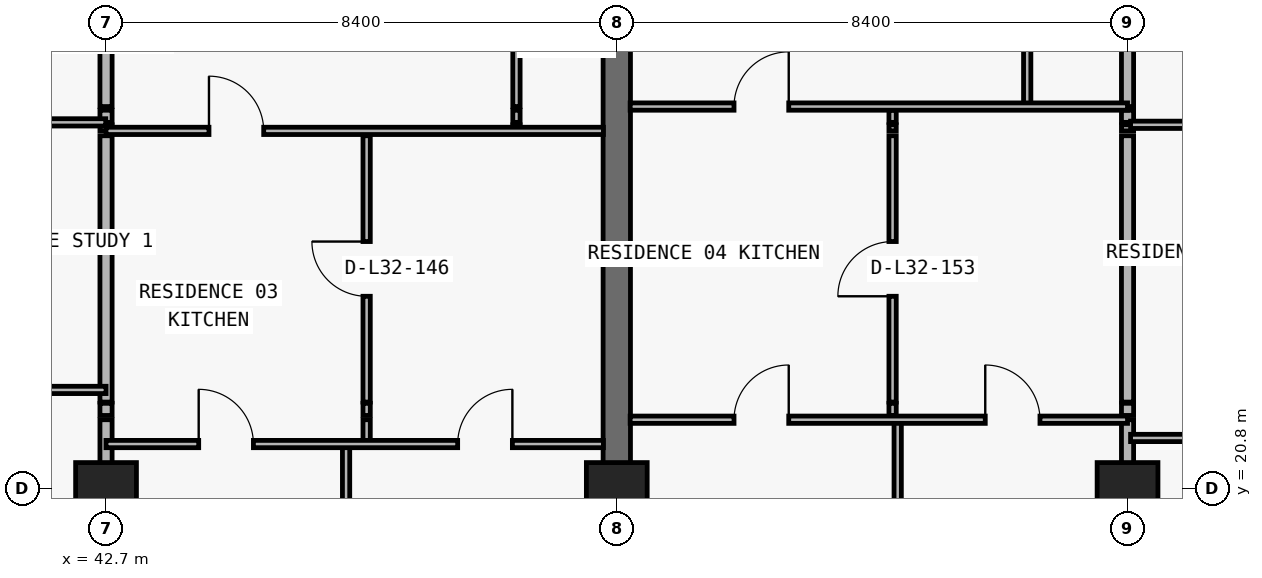
"""IFC4 building model, lengths in metres.
Left out: names, types, materials, properties, quantities, classifications, styles, units other than length and angle.
Written with IfcOpenShell. Run it as: python <this file> out.ifc"""

import sys

from ifc_helpers import new_model, si_unit, direction, frame, frame_2d, origin, origin_2d, place, context, subcontext, project, spatial, rectangle, extrude, element, fill, save


model = new_model("IFC4")
c1 = context("Model", 3, precision=1e-05, world=origin(), true_north=direction((0.0, 1.0)))
c2 = subcontext(c1, "Body", "Model", "MODEL_VIEW")
j1 = project(units=[si_unit("LENGTHUNIT", "METRE"), si_unit("PLANEANGLEUNIT", "RADIAN")], contexts=[c1])
p1 = place(None, origin())
s1 = spatial("IfcSite", under=j1, at=p1, CompositionType="ELEMENT")
p2 = place(p1, origin())
s2 = spatial("IfcBuilding", under=s1, at=p2, CompositionType="ELEMENT")
p3 = place(p2, frame((0.0, 0.0, 119.1)))
s3 = spatial("IfcBuildingStorey", under=s2, at=p3, CompositionType="ELEMENT", Elevation=119.1)
for number, where, z_axis, x_axis in (
    (1, (42.7, 20.8, 0.0), (0.0, 0.0, 1.0), (1.0, 0.0, 0.0)),
    (2, (51.1, 20.8, 0.0), (0.0, 0.0, 1.0), (1.0, 0.0, 0.0)),
    (3, (59.5, 20.8, 0.0), (0.0, 0.0, 1.0), (1.0, 0.0, 0.0)),
):
    element("IfcColumn", number, at=place(p3, frame(where, z_axis=z_axis, x_axis=x_axis)), inside=s3, PredefinedType="COLUMN", context=c2, shape_type="SweptSolid", body=[
        extrude(rectangle(XDim=1.0, YDim=0.85, at=origin_2d()), origin(), (0.0, 0.0, 1.0), 3.05),
    ])
p4 = place(p3, frame((51.1, 20.8, 0.0), z_axis=(0.0, 0.0, 1.0), x_axis=(0.0, 1.0, 0.0)))
e4 = element("IfcWall", 4, at=p4, inside=s3, PredefinedType="SHEAR", context=c2, shape_type="SweptSolid", body=[
    extrude(rectangle(XDim=8.6, YDim=0.45, at=frame_2d((4.3, 0.0))), origin(), (0.0, 0.0, 1.0), 3.05),
])
p5 = place(p3, frame((42.7, 8.84, 0.0), z_axis=(0.0, 0.0, 1.0), x_axis=(0.0, 1.0, 0.0)))
e5 = element("IfcWall", 5, at=p5, inside=s3, PredefinedType="PARTITIONING", context=c2, shape_type="SweptSolid", body=[
    extrude(rectangle(XDim=13.09, YDim=0.2, at=frame_2d((6.545, 0.0))), origin(), (0.0, 0.0, 1.0), 2.174),
])
p6 = place(p3, frame((42.7, 22.0, 0.0), z_axis=(0.0, 0.0, 1.0), x_axis=(0.0, 1.0, 0.0)))
e6 = element("IfcWall", 6, at=p6, inside=s3, PredefinedType="PARTITIONING", context=c2, shape_type="SweptSolid", body=[
    extrude(rectangle(XDim=0.2, YDim=0.2, at=frame_2d((0.1, 0.0))), origin(), (0.0, 0.0, 1.0), 2.174),
])
p7 = place(p3, frame((42.7, 22.22, 0.0), z_axis=(0.0, 0.0, 1.0), x_axis=(0.0, 1.0, 0.0)))
e7 = element("IfcWall", 7, at=p7, inside=s3, PredefinedType="PARTITIONING", context=c2, shape_type="SweptSolid", body=[
    extrude(rectangle(XDim=4.38, YDim=0.2, at=frame_2d((2.19, 0.0))), origin(), (0.0, 0.0, 1.0), 2.174),
])
p8 = place(p3, frame((42.7, 26.68, 0.0), z_axis=(0.0, 0.0, 1.0), x_axis=(0.0, 1.0, 0.0)))
e8 = element("IfcWall", 8, at=p8, inside=s3, PredefinedType="PARTITIONING", context=c2, shape_type="SweptSolid", body=[
    extrude(rectangle(XDim=0.1, YDim=0.2, at=frame_2d((0.05, 0.0))), origin(), (0.0, 0.0, 1.0), 2.174),
])
p9 = place(p3, frame((42.7, 26.82, 0.0), z_axis=(0.0, 0.0, 1.0), x_axis=(0.0, 1.0, 0.0)))
e9 = element("IfcWall", 9, at=p9, inside=s3, PredefinedType="PARTITIONING", context=c2, shape_type="SweptSolid", body=[
    extrude(rectangle(XDim=0.2, YDim=0.2, at=frame_2d((0.1, 0.0))), origin(), (0.0, 0.0, 1.0), 2.174),
])
p10 = place(p3, frame((42.7, 27.08, 0.0), z_axis=(0.0, 0.0, 1.0), x_axis=(0.0, 1.0, 0.0)))
e10 = element("IfcWall", 10, at=p10, inside=s3, PredefinedType="PARTITIONING", context=c2, shape_type="SweptSolid", body=[
    extrude(rectangle(XDim=6.52, YDim=0.2, at=frame_2d((3.26, 0.0))), origin(), (0.0, 0.0, 1.0), 2.174),
])
p11 = place(p3, frame((46.648, 8.84, 0.0), z_axis=(0.0, 0.0, 1.0), x_axis=(0.0, 1.0, 0.0)))
e11 = element("IfcWall", 11, at=p11, inside=s3, PredefinedType="PARTITIONING", context=c2, shape_type="SweptSolid", body=[
    extrude(rectangle(XDim=12.69, YDim=0.12, at=frame_2d((6.345, 0.0))), origin(), (0.0, 0.0, 1.0), 3.05),
])
p12 = place(p3, frame((46.986, 21.53, 0.0), z_axis=(0.0, 0.0, 1.0), x_axis=(0.0, 1.0, 0.0)))
e12 = element("IfcWall", 12, at=p12, inside=s3, PredefinedType="PARTITIONING", context=c2, shape_type="SweptSolid", body=[
    extrude(rectangle(XDim=0.4, YDim=0.12, at=frame_2d((0.2, 0.0))), origin(), (0.0, 0.0, 1.0), 3.05),
])
p13 = place(p3, frame((46.986, 22.0, 0.0), z_axis=(0.0, 0.0, 1.0), x_axis=(0.0, 1.0, 0.0)))
e13 = element("IfcWall", 13, at=p13, inside=s3, PredefinedType="PARTITIONING", context=c2, shape_type="SweptSolid", body=[
    extrude(rectangle(XDim=0.2, YDim=0.12, at=frame_2d((0.1, 0.0))), origin(), (0.0, 0.0, 1.0), 3.05),
])
p14 = place(p3, frame((46.986, 22.22, 0.0), z_axis=(0.0, 0.0, 1.0), x_axis=(0.0, 1.0, 0.0)))
e14 = element("IfcWall", 14, at=p14, inside=s3, PredefinedType="PARTITIONING", context=c2, shape_type="SweptSolid", body=[
    extrude(rectangle(XDim=4.38, YDim=0.12, at=frame_2d((2.19, 0.0))), origin(), (0.0, 0.0, 1.0), 3.05),
])
p15 = place(p14, frame((1.74, 0.0, 0.0)))
e15 = element("IfcOpeningElement", 15, at=p15, cuts=e14, PredefinedType="OPENING", context=c2, shape_type="SweptSolid", body=[
    extrude(rectangle(XDim=0.9, YDim=2.15, at=frame_2d((0.45, 1.075))), frame((0.0, 0.07, 0.0), z_axis=(0.0, -1.0, 0.0), x_axis=(1.0, 0.0, 0.0)), (0.0, 0.0, 1.0), 0.14),
])
p16 = place(p3, frame((49.45, 26.68, 0.0), z_axis=(0.0, 0.0, 1.0), x_axis=(0.0, 1.0, 0.0)))
e16 = element("IfcWall", 16, at=p16, inside=s3, PredefinedType="PARTITIONING", context=c2, shape_type="SweptSolid", body=[
    extrude(rectangle(XDim=0.1, YDim=0.12, at=frame_2d((0.05, 0.0))), origin(), (0.0, 0.0, 1.0), 3.05),
])
p17 = place(p3, frame((49.45, 26.82, 0.0), z_axis=(0.0, 0.0, 1.0), x_axis=(0.0, 1.0, 0.0)))
e17 = element("IfcWall", 17, at=p17, inside=s3, PredefinedType="PARTITIONING", context=c2, shape_type="SweptSolid", body=[
    extrude(rectangle(XDim=0.2, YDim=0.12, at=frame_2d((0.1, 0.0))), origin(), (0.0, 0.0, 1.0), 3.05),
])
p18 = place(p3, frame((49.45, 27.08, 0.0), z_axis=(0.0, 0.0, 1.0), x_axis=(0.0, 1.0, 0.0)))
e18 = element("IfcWall", 18, at=p18, inside=s3, PredefinedType="PARTITIONING", context=c2, shape_type="SweptSolid", body=[
    extrude(rectangle(XDim=6.52, YDim=0.12, at=frame_2d((3.26, 0.0))), origin(), (0.0, 0.0, 1.0), 3.05),
])
p19 = place(p18, frame((3.285, 0.0, 0.0)))
e19 = element("IfcOpeningElement", 19, at=p19, cuts=e18, PredefinedType="OPENING", context=c2, shape_type="SweptSolid", body=[
    extrude(rectangle(XDim=0.85, YDim=2.1, at=frame_2d((0.425, 1.05))), frame((0.0, 0.07, 0.0), z_axis=(0.0, -1.0, 0.0), x_axis=(1.0, 0.0, 0.0)), (0.0, 0.0, 1.0), 0.14),
])
p20 = place(p3, frame((51.1, 8.84, 0.0), z_axis=(0.0, 0.0, 1.0), x_axis=(0.0, 1.0, 0.0)))
e20 = element("IfcWall", 20, at=p20, inside=s3, PredefinedType="PARTITIONING", context=c2, shape_type="SweptSolid", body=[
    extrude(rectangle(XDim=11.955, YDim=0.2, at=frame_2d((5.978, 0.0))), origin(), (0.0, 0.0, 1.0), 2.174),
])
p21 = place(p3, frame((55.636, 22.0, 0.0), z_axis=(0.0, 0.0, 1.0), x_axis=(0.0, 1.0, 0.0)))
e21 = element("IfcWall", 21, at=p21, inside=s3, PredefinedType="PARTITIONING", context=c2, shape_type="SweptSolid", body=[
    extrude(rectangle(XDim=0.2, YDim=0.12, at=frame_2d((0.1, 0.0))), origin(), (0.0, 0.0, 1.0), 3.05),
])
p22 = place(p3, frame((55.636, 22.22, 0.0), z_axis=(0.0, 0.0, 1.0), x_axis=(0.0, 1.0, 0.0)))
e22 = element("IfcWall", 22, at=p22, inside=s3, PredefinedType="PARTITIONING", context=c2, shape_type="SweptSolid", body=[
    extrude(rectangle(XDim=4.38, YDim=0.12, at=frame_2d((2.19, 0.0))), origin(), (0.0, 0.0, 1.0), 3.05),
])
p23 = place(p22, frame((1.74, 0.0, 0.0)))
e23 = element("IfcOpeningElement", 23, at=p23, cuts=e22, PredefinedType="OPENING", context=c2, shape_type="SweptSolid", body=[
    extrude(rectangle(XDim=0.9, YDim=2.15, at=frame_2d((0.45, 1.075))), frame((0.0, 0.07, 0.0), z_axis=(0.0, -1.0, 0.0), x_axis=(1.0, 0.0, 0.0)), (0.0, 0.0, 1.0), 0.14),
])
p24 = place(p3, frame((55.636, 26.68, 0.0), z_axis=(0.0, 0.0, 1.0), x_axis=(0.0, 1.0, 0.0)))
e24 = element("IfcWall", 24, at=p24, inside=s3, PredefinedType="PARTITIONING", context=c2, shape_type="SweptSolid", body=[
    extrude(rectangle(XDim=0.1, YDim=0.12, at=frame_2d((0.05, 0.0))), origin(), (0.0, 0.0, 1.0), 3.05),
])
p25 = place(p3, frame((55.636, 26.82, 0.0), z_axis=(0.0, 0.0, 1.0), x_axis=(0.0, 1.0, 0.0)))
e25 = element("IfcWall", 25, at=p25, inside=s3, PredefinedType="PARTITIONING", context=c2, shape_type="SweptSolid", body=[
    extrude(rectangle(XDim=0.2, YDim=0.12, at=frame_2d((0.1, 0.0))), origin(), (0.0, 0.0, 1.0), 3.05),
])
p26 = place(p3, frame((55.72, 8.84, 0.0), z_axis=(0.0, 0.0, 1.0), x_axis=(0.0, 1.0, 0.0)))
e26 = element("IfcWall", 26, at=p26, inside=s3, PredefinedType="PARTITIONING", context=c2, shape_type="SweptSolid", body=[
    extrude(rectangle(XDim=13.09, YDim=0.12, at=frame_2d((6.545, 0.0))), origin(), (0.0, 0.0, 1.0), 3.05),
])
p27 = place(p3, frame((57.85, 27.08, 0.0), z_axis=(0.0, 0.0, 1.0), x_axis=(0.0, 1.0, 0.0)))
e27 = element("IfcWall", 27, at=p27, inside=s3, PredefinedType="PARTITIONING", context=c2, shape_type="SweptSolid", body=[
    extrude(rectangle(XDim=6.52, YDim=0.12, at=frame_2d((3.26, 0.0))), origin(), (0.0, 0.0, 1.0), 3.05),
])
p28 = place(p27, frame((3.285, 0.0, 0.0)))
e28 = element("IfcOpeningElement", 28, at=p28, cuts=e27, PredefinedType="OPENING", context=c2, shape_type="SweptSolid", body=[
    extrude(rectangle(XDim=0.85, YDim=2.1, at=frame_2d((0.425, 1.05))), frame((0.0, 0.07, 0.0), z_axis=(0.0, -1.0, 0.0), x_axis=(1.0, 0.0, 0.0)), (0.0, 0.0, 1.0), 0.14),
])
p29 = place(p3, frame((59.5, 8.84, 0.0), z_axis=(0.0, 0.0, 1.0), x_axis=(0.0, 1.0, 0.0)))
e29 = element("IfcWall", 29, at=p29, inside=s3, PredefinedType="PARTITIONING", context=c2, shape_type="SweptSolid", body=[
    extrude(rectangle(XDim=13.09, YDim=0.2, at=frame_2d((6.545, 0.0))), origin(), (0.0, 0.0, 1.0), 2.174),
])
p30 = place(p3, frame((59.5, 22.0, 0.0), z_axis=(0.0, 0.0, 1.0), x_axis=(0.0, 1.0, 0.0)))
e30 = element("IfcWall", 30, at=p30, inside=s3, PredefinedType="PARTITIONING", context=c2, shape_type="SweptSolid", body=[
    extrude(rectangle(XDim=0.2, YDim=0.2, at=frame_2d((0.1, 0.0))), origin(), (0.0, 0.0, 1.0), 2.174),
])
p31 = place(p3, frame((59.5, 22.22, 0.0), z_axis=(0.0, 0.0, 1.0), x_axis=(0.0, 1.0, 0.0)))
e31 = element("IfcWall", 31, at=p31, inside=s3, PredefinedType="PARTITIONING", context=c2, shape_type="SweptSolid", body=[
    extrude(rectangle(XDim=4.38, YDim=0.2, at=frame_2d((2.19, 0.0))), origin(), (0.0, 0.0, 1.0), 2.174),
])
p32 = place(p3, frame((59.5, 26.68, 0.0), z_axis=(0.0, 0.0, 1.0), x_axis=(0.0, 1.0, 0.0)))
e32 = element("IfcWall", 32, at=p32, inside=s3, PredefinedType="PARTITIONING", context=c2, shape_type="SweptSolid", body=[
    extrude(rectangle(XDim=0.1, YDim=0.2, at=frame_2d((0.05, 0.0))), origin(), (0.0, 0.0, 1.0), 2.174),
])
p33 = place(p3, frame((59.5, 26.82, 0.0), z_axis=(0.0, 0.0, 1.0), x_axis=(0.0, 1.0, 0.0)))
e33 = element("IfcWall", 33, at=p33, inside=s3, PredefinedType="PARTITIONING", context=c2, shape_type="SweptSolid", body=[
    extrude(rectangle(XDim=0.2, YDim=0.2, at=frame_2d((0.1, 0.0))), origin(), (0.0, 0.0, 1.0), 2.174),
])
p34 = place(p3, frame((59.5, 27.08, 0.0), z_axis=(0.0, 0.0, 1.0), x_axis=(0.0, 1.0, 0.0)))
e34 = element("IfcWall", 34, at=p34, inside=s3, PredefinedType="PARTITIONING", context=c2, shape_type="SweptSolid", body=[
    extrude(rectangle(XDim=6.52, YDim=0.2, at=frame_2d((3.26, 0.0))), origin(), (0.0, 0.0, 1.0), 2.174),
])
p35 = place(p3, frame((42.7, 21.53, 0.0), z_axis=(0.0, 0.0, 1.0), x_axis=(1.0, 0.0, 0.0)))
e35 = element("IfcWall", 35, at=p35, inside=s3, PredefinedType="PARTITIONING", context=c2, shape_type="SweptSolid", body=[
    extrude(rectangle(XDim=8.18, YDim=0.12, at=frame_2d((4.09, 0.0))), origin(), (0.0, 0.0, 1.0), 3.05),
])
p36 = place(p35, frame((1.524, 0.0, 0.0)))
e36 = element("IfcOpeningElement", 36, at=p36, cuts=e35, PredefinedType="OPENING", context=c2, shape_type="SweptSolid", body=[
    extrude(rectangle(XDim=0.9, YDim=2.15, at=frame_2d((0.45, 1.075))), frame((0.0, 0.07, 0.0), z_axis=(0.0, -1.0, 0.0), x_axis=(1.0, 0.0, 0.0)), (0.0, 0.0, 1.0), 0.14),
])
p37 = place(p35, frame((5.783, 0.0, 0.0)))
e37 = element("IfcOpeningElement", 37, at=p37, cuts=e35, PredefinedType="OPENING", context=c2, shape_type="SweptSolid", body=[
    extrude(rectangle(XDim=0.9, YDim=2.15, at=frame_2d((0.45, 1.075))), frame((0.0, 0.07, 0.0), z_axis=(0.0, -1.0, 0.0), x_axis=(1.0, 0.0, 0.0)), (0.0, 0.0, 1.0), 0.14),
])
p38 = place(p3, frame((59.55, 21.63, 0.0), z_axis=(0.0, 0.0, 1.0), x_axis=(1.0, 0.0, 0.0)))
e38 = element("IfcWall", 38, at=p38, inside=s3, PredefinedType="PARTITIONING", context=c2, shape_type="SweptSolid", body=[
    extrude(rectangle(XDim=8.35, YDim=0.12, at=frame_2d((4.175, 0.0))), origin(), (0.0, 0.0, 1.0), 3.05),
])
p39 = place(p38, frame((1.499, 0.0, 0.0)))
e39 = element("IfcOpeningElement", 39, at=p39, cuts=e38, PredefinedType="OPENING", context=c2, shape_type="SweptSolid", body=[
    extrude(rectangle(XDim=0.9, YDim=2.15, at=frame_2d((0.45, 1.075))), frame((0.0, 0.07, 0.0), z_axis=(0.0, -1.0, 0.0), x_axis=(1.0, 0.0, 0.0)), (0.0, 0.0, 1.0), 0.14),
])
p40 = place(p38, frame((6.093, 0.0, 0.0)))
e40 = element("IfcOpeningElement", 40, at=p40, cuts=e38, PredefinedType="OPENING", context=c2, shape_type="SweptSolid", body=[
    extrude(rectangle(XDim=0.9, YDim=2.15, at=frame_2d((0.45, 1.075))), frame((0.0, 0.07, 0.0), z_axis=(0.0, -1.0, 0.0), x_axis=(1.0, 0.0, 0.0)), (0.0, 0.0, 1.0), 0.14),
])
p41 = place(p3, frame((51.32, 21.93, 0.0), z_axis=(0.0, 0.0, 1.0), x_axis=(1.0, 0.0, 0.0)))
e41 = element("IfcWall", 41, at=p41, inside=s3, PredefinedType="PARTITIONING", context=c2, shape_type="SweptSolid", body=[
    extrude(rectangle(XDim=8.18, YDim=0.12, at=frame_2d((4.09, 0.0))), origin(), (0.0, 0.0, 1.0), 3.05),
])
p42 = place(p41, frame((1.708, 0.0, 0.0)))
e42 = element("IfcOpeningElement", 42, at=p42, cuts=e41, PredefinedType="OPENING", context=c2, shape_type="SweptSolid", body=[
    extrude(rectangle(XDim=0.9, YDim=2.15, at=frame_2d((0.45, 1.075))), frame((0.0, 0.07, 0.0), z_axis=(0.0, -1.0, 0.0), x_axis=(1.0, 0.0, 0.0)), (0.0, 0.0, 1.0), 0.14),
])
p43 = place(p41, frame((5.84, 0.0, 0.0)))
e43 = element("IfcOpeningElement", 43, at=p43, cuts=e41, PredefinedType="OPENING", context=c2, shape_type="SweptSolid", body=[
    extrude(rectangle(XDim=0.9, YDim=2.15, at=frame_2d((0.45, 1.075))), frame((0.0, 0.07, 0.0), z_axis=(0.0, -1.0, 0.0), x_axis=(1.0, 0.0, 0.0)), (0.0, 0.0, 1.0), 0.14),
])
p44 = place(p3, frame((35.1, 22.42, 0.0), z_axis=(0.0, 0.0, 1.0), x_axis=(1.0, 0.0, 0.0)))
e44 = element("IfcWall", 44, at=p44, inside=s3, PredefinedType="PARTITIONING", context=c2, shape_type="SweptSolid", body=[
    extrude(rectangle(XDim=7.6, YDim=0.12, at=frame_2d((3.8, 0.0))), origin(), (0.0, 0.0, 1.0), 3.05),
])
p45 = place(p44, frame((3.35, 0.0, 0.0)))
e45 = element("IfcOpeningElement", 45, at=p45, cuts=e44, PredefinedType="OPENING", context=c2, shape_type="SweptSolid", body=[
    extrude(rectangle(XDim=0.9, YDim=2.15, at=frame_2d((0.45, 1.075))), frame((0.0, 0.07, 0.0), z_axis=(0.0, -1.0, 0.0), x_axis=(1.0, 0.0, 0.0)), (0.0, 0.0, 1.0), 0.14),
])
p46 = place(p3, frame((42.7, 26.68, 0.0), z_axis=(0.0, 0.0, 1.0), x_axis=(1.0, 0.0, 0.0)))
e46 = element("IfcWall", 46, at=p46, inside=s3, PredefinedType="PARTITIONING", context=c2, shape_type="SweptSolid", body=[
    extrude(rectangle(XDim=8.18, YDim=0.12, at=frame_2d((4.09, 0.0))), origin(), (0.0, 0.0, 1.0), 3.05),
])
p47 = place(p46, frame((1.693, 0.0, 0.0)))
e47 = element("IfcOpeningElement", 47, at=p47, cuts=e46, PredefinedType="OPENING", context=c2, shape_type="SweptSolid", body=[
    extrude(rectangle(XDim=0.9, YDim=2.15, at=frame_2d((0.45, 1.075))), frame((0.0, 0.07, 0.0), z_axis=(0.0, -1.0, 0.0), x_axis=(1.0, 0.0, 0.0)), (0.0, 0.0, 1.0), 0.14),
])
p48 = place(p3, frame((59.55, 26.78, 0.0), z_axis=(0.0, 0.0, 1.0), x_axis=(1.0, 0.0, 0.0)))
e48 = element("IfcWall", 48, at=p48, inside=s3, PredefinedType="PARTITIONING", context=c2, shape_type="SweptSolid", body=[
    extrude(rectangle(XDim=8.35, YDim=0.12, at=frame_2d((4.175, 0.0))), origin(), (0.0, 0.0, 1.0), 3.05),
])
p49 = place(p48, frame((1.918, 0.0, 0.0)))
e49 = element("IfcOpeningElement", 49, at=p49, cuts=e48, PredefinedType="OPENING", context=c2, shape_type="SweptSolid", body=[
    extrude(rectangle(XDim=0.9, YDim=2.15, at=frame_2d((0.45, 1.075))), frame((0.0, 0.07, 0.0), z_axis=(0.0, -1.0, 0.0), x_axis=(1.0, 0.0, 0.0)), (0.0, 0.0, 1.0), 0.14),
])
p50 = place(p3, frame((35.1, 26.82, 0.0), z_axis=(0.0, 0.0, 1.0), x_axis=(1.0, 0.0, 0.0)))
e50 = element("IfcWall", 50, at=p50, inside=s3, PredefinedType="PARTITIONING", context=c2, shape_type="SweptSolid", body=[
    extrude(rectangle(XDim=7.595, YDim=0.12, at=frame_2d((3.797, 0.0))), origin(), (0.0, 0.0, 1.0), 3.05),
])
p51 = place(p50, frame((2.6, 0.0, 0.0)))
e51 = element("IfcOpeningElement", 51, at=p51, cuts=e50, PredefinedType="OPENING", context=c2, shape_type="SweptSolid", body=[
    extrude(rectangle(XDim=0.9, YDim=2.15, at=frame_2d((0.45, 1.075))), frame((0.0, 0.07, 0.0), z_axis=(0.0, -1.0, 0.0), x_axis=(1.0, 0.0, 0.0)), (0.0, 0.0, 1.0), 0.14),
])
p52 = place(p3, frame((51.32, 27.08, 0.0), z_axis=(0.0, 0.0, 1.0), x_axis=(1.0, 0.0, 0.0)))
e52 = element("IfcWall", 52, at=p52, inside=s3, PredefinedType="PARTITIONING", context=c2, shape_type="SweptSolid", body=[
    extrude(rectangle(XDim=8.18, YDim=0.12, at=frame_2d((4.09, 0.0))), origin(), (0.0, 0.0, 1.0), 3.05),
])
p53 = place(p52, frame((1.708, 0.0, 0.0)))
e53 = element("IfcOpeningElement", 53, at=p53, cuts=e52, PredefinedType="OPENING", context=c2, shape_type="SweptSolid", body=[
    extrude(rectangle(XDim=0.9, YDim=2.15, at=frame_2d((0.45, 1.075))), frame((0.0, 0.07, 0.0), z_axis=(0.0, -1.0, 0.0), x_axis=(1.0, 0.0, 0.0)), (0.0, 0.0, 1.0), 0.14),
])
p54 = place(p47, origin())
e54 = element("IfcDoor", 54, at=p54, inside=s3, OperationType="SINGLE_SWING_LEFT", PredefinedType="DOOR", context=c2, shape_type="SweptSolid", body=[
    extrude(rectangle(XDim=0.9, YDim=2.15, at=frame_2d((0.45, 1.075))), frame((0.0, 0.025, 0.0), z_axis=(0.0, -1.0, 0.0), x_axis=(1.0, 0.0, 0.0)), (0.0, 0.0, 1.0), 0.05),
])
fill(e47, e54)
p55 = place(p15, origin())
e55 = element("IfcDoor", 55, at=p55, inside=s3, OperationType="SINGLE_SWING_RIGHT", PredefinedType="DOOR", context=c2, shape_type="SweptSolid", body=[
    extrude(rectangle(XDim=0.9, YDim=2.15, at=frame_2d((0.45, 1.075))), frame((0.0, 0.025, 0.0), z_axis=(0.0, -1.0, 0.0), x_axis=(1.0, 0.0, 0.0)), (0.0, 0.0, 1.0), 0.05),
])
fill(e15, e55)
p56 = place(p36, origin())
e56 = element("IfcDoor", 56, at=p56, inside=s3, OperationType="SINGLE_SWING_LEFT", PredefinedType="DOOR", context=c2, shape_type="SweptSolid", body=[
    extrude(rectangle(XDim=0.9, YDim=2.15, at=frame_2d((0.45, 1.075))), frame((0.0, 0.025, 0.0), z_axis=(0.0, -1.0, 0.0), x_axis=(1.0, 0.0, 0.0)), (0.0, 0.0, 1.0), 0.05),
])
fill(e36, e56)
p57 = place(p37, origin())
e57 = element("IfcDoor", 57, at=p57, inside=s3, OperationType="SINGLE_SWING_RIGHT", PredefinedType="DOOR", context=c2, shape_type="SweptSolid", body=[
    extrude(rectangle(XDim=0.9, YDim=2.15, at=frame_2d((0.45, 1.075))), frame((0.0, 0.025, 0.0), z_axis=(0.0, -1.0, 0.0), x_axis=(1.0, 0.0, 0.0)), (0.0, 0.0, 1.0), 0.05),
])
fill(e37, e57)
p58 = place(p53, origin())
e58 = element("IfcDoor", 58, at=p58, inside=s3, OperationType="SINGLE_SWING_RIGHT", PredefinedType="DOOR", context=c2, shape_type="SweptSolid", body=[
    extrude(rectangle(XDim=0.9, YDim=2.15, at=frame_2d((0.45, 1.075))), frame((0.0, 0.025, 0.0), z_axis=(0.0, -1.0, 0.0), x_axis=(1.0, 0.0, 0.0)), (0.0, 0.0, 1.0), 0.05),
])
fill(e53, e58)
p59 = place(p23, origin())
e59 = element("IfcDoor", 59, at=p59, inside=s3, OperationType="SINGLE_SWING_LEFT", PredefinedType="DOOR", context=c2, shape_type="SweptSolid", body=[
    extrude(rectangle(XDim=0.9, YDim=2.15, at=frame_2d((0.45, 1.075))), frame((0.0, 0.025, 0.0), z_axis=(0.0, -1.0, 0.0), x_axis=(1.0, 0.0, 0.0)), (0.0, 0.0, 1.0), 0.05),
])
fill(e23, e59)
p60 = place(p42, origin())
e60 = element("IfcDoor", 60, at=p60, inside=s3, OperationType="SINGLE_SWING_RIGHT", PredefinedType="DOOR", context=c2, shape_type="SweptSolid", body=[
    extrude(rectangle(XDim=0.9, YDim=2.15, at=frame_2d((0.45, 1.075))), frame((0.0, 0.025, 0.0), z_axis=(0.0, -1.0, 0.0), x_axis=(1.0, 0.0, 0.0)), (0.0, 0.0, 1.0), 0.05),
])
fill(e42, e60)
p61 = place(p43, origin())
e61 = element("IfcDoor", 61, at=p61, inside=s3, OperationType="SINGLE_SWING_LEFT", PredefinedType="DOOR", context=c2, shape_type="SweptSolid", body=[
    extrude(rectangle(XDim=0.9, YDim=2.15, at=frame_2d((0.45, 1.075))), frame((0.0, 0.025, 0.0), z_axis=(0.0, -1.0, 0.0), x_axis=(1.0, 0.0, 0.0)), (0.0, 0.0, 1.0), 0.05),
])
fill(e43, e61)
save(model, sys.argv[1])
